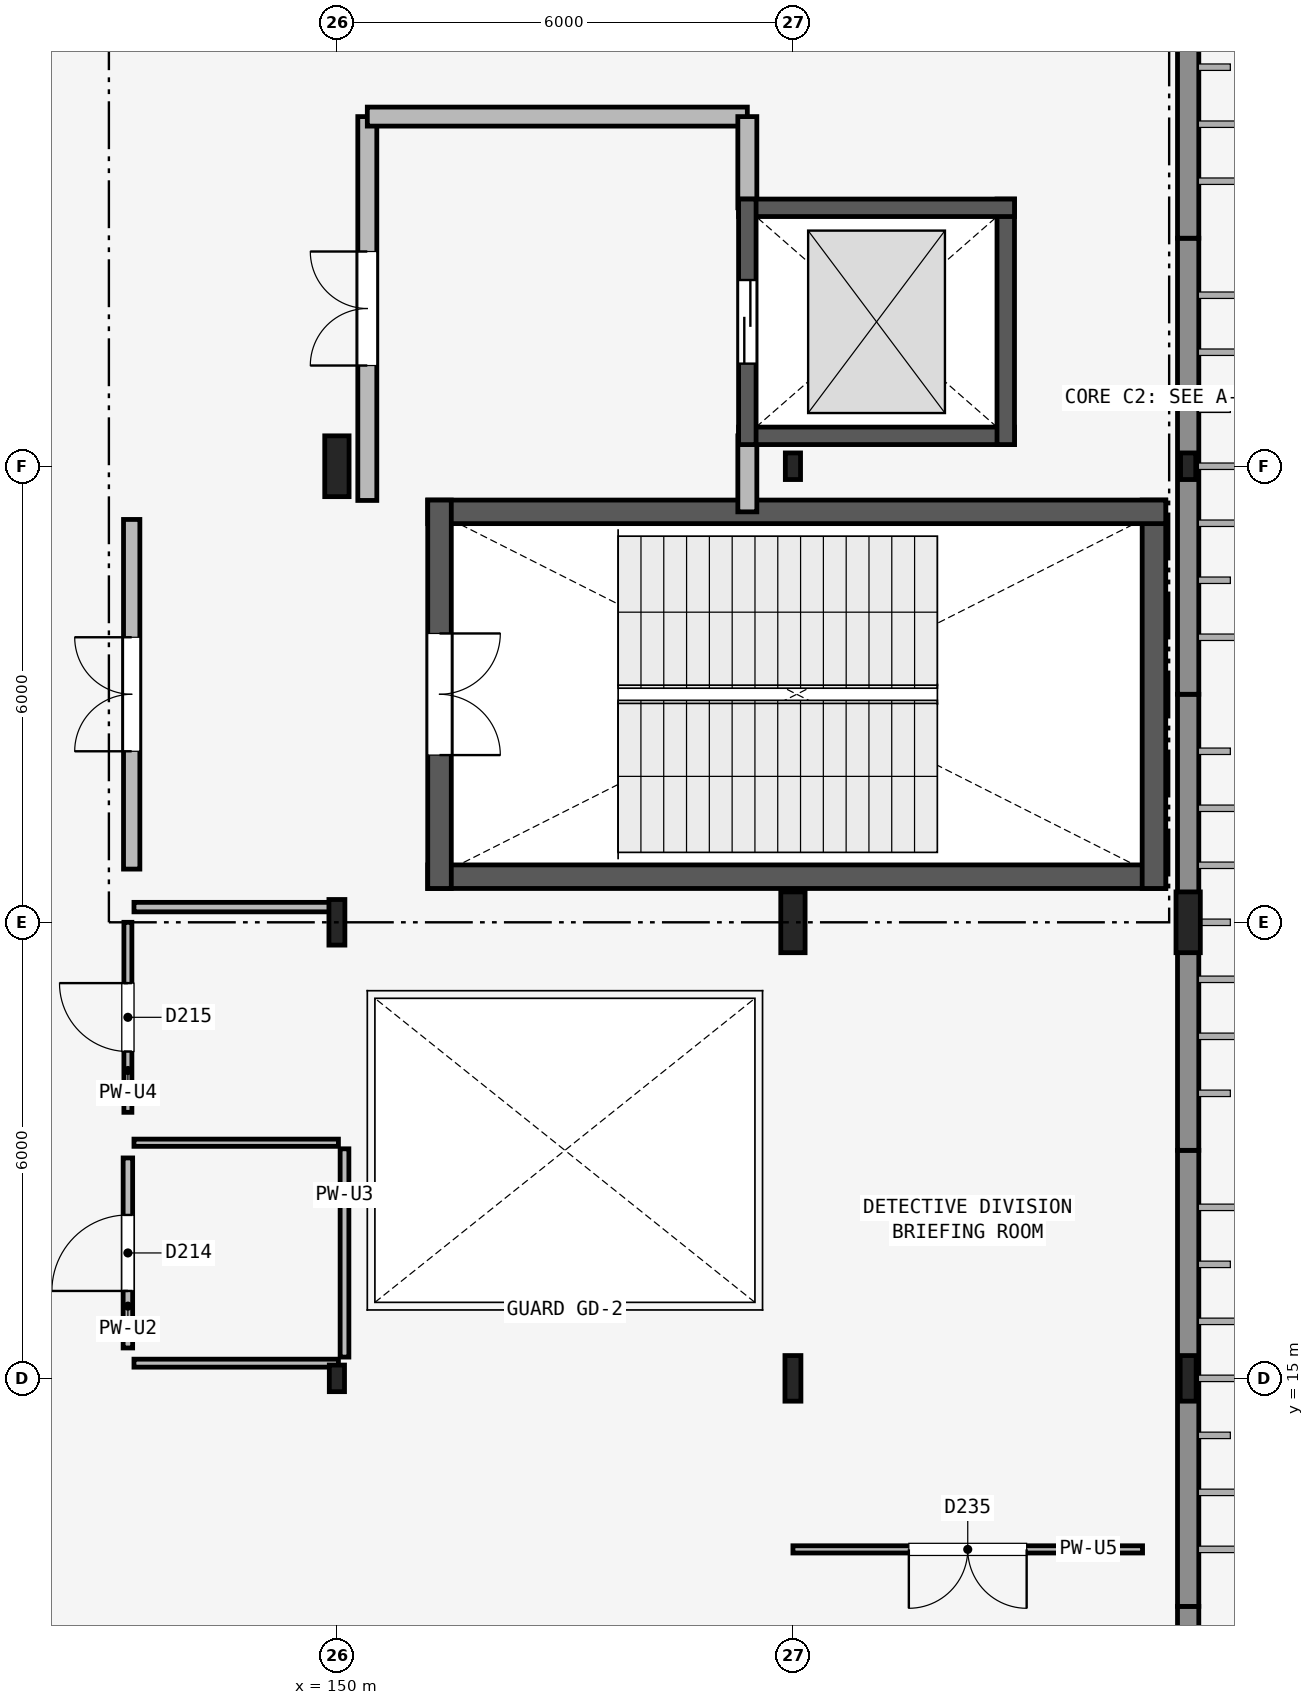
"""IFC4 building model, lengths in metres.
Left out: names, types, materials, properties, quantities, classifications, styles, units other than length and angle.
Written with IfcOpenShell. Run it as: python <this file> out.ifc"""

import sys

from ifc_helpers import new_model, si_unit, direction, frame, frame_2d, origin, origin_2d, place, context, subcontext, project, spatial, rectangle, hollow_rectangle, i_section, extrude, element, fill, save


model = new_model("IFC4")
c1 = context("Model", 3, precision=1e-05, world=origin(), true_north=direction((0.0, 1.0)))
c2 = subcontext(c1, "Body", "Model", "MODEL_VIEW")
j1 = project(units=[si_unit("LENGTHUNIT", "METRE"), si_unit("PLANEANGLEUNIT", "RADIAN")], contexts=[c1])
p1 = place(None, origin())
s1 = spatial("IfcSite", under=j1, at=p1, CompositionType="ELEMENT")
p2 = place(p1, origin())
s2 = spatial("IfcBuilding", under=s1, at=p2, CompositionType="ELEMENT")
p3 = place(p2, frame((0.0, 0.0, 9.3)))
s3 = spatial("IfcBuildingStorey", under=s2, at=p3, CompositionType="ELEMENT", Elevation=9.3)
p4 = place(p3, frame((150.0, 15.0, 0.0), z_axis=(0.0, 0.0, 1.0), x_axis=(1.0, 0.0, 0.0)))
e1 = element("IfcColumn", 1, at=p4, inside=s3, PredefinedType="COLUMN", context=c2, shape_type="SweptSolid", body=[
    extrude(hollow_rectangle(XDim=0.2, YDim=0.35, WallThickness=0.012, InnerFilletRadius=0.012, OuterFilletRadius=0.024, at=origin_2d()), origin(), (0.0, 0.0, 1.0), 4.2),
])
p5 = place(p3, frame((150.0, 21.0, 0.0), z_axis=(0.0, 0.0, 1.0), x_axis=(1.0, 0.0, 0.0)))
e2 = element("IfcColumn", 2, at=p5, inside=s3, PredefinedType="COLUMN", context=c2, shape_type="SweptSolid", body=[
    extrude(i_section(OverallWidth=0.21, OverallDepth=0.6, WebThickness=0.012, FlangeThickness=0.021, FilletRadius=0.02, at=origin_2d()), origin(), (0.0, 0.0, 1.0), 4.2),
])
p6 = place(p3, frame((150.0, 27.0, 0.0), z_axis=(0.0, 0.0, 1.0), x_axis=(1.0, 0.0, 0.0)))
e3 = element("IfcColumn", 3, at=p6, inside=s3, PredefinedType="COLUMN", context=c2, shape_type="SweptSolid", body=[
    extrude(i_section(OverallWidth=0.32, OverallDepth=0.8, WebThickness=0.016, FlangeThickness=0.028, at=origin_2d()), origin(), (0.0, 0.0, 1.0), 4.2),
])
p7 = place(p3, frame((156.0, 15.0, 0.0), z_axis=(0.0, 0.0, 1.0), x_axis=(1.0, 0.0, 0.0)))
e4 = element("IfcColumn", 4, at=p7, inside=s3, PredefinedType="COLUMN", context=c2, shape_type="SweptSolid", body=[
    extrude(i_section(OverallWidth=0.21, OverallDepth=0.6, WebThickness=0.012, FlangeThickness=0.021, FilletRadius=0.02, at=origin_2d()), origin(), (0.0, 0.0, 1.0), 4.2),
])
p8 = place(p3, frame((156.0, 21.0, 0.0), z_axis=(0.0, 0.0, 1.0), x_axis=(1.0, 0.0, 0.0)))
e5 = element("IfcColumn", 5, at=p8, inside=s3, PredefinedType="COLUMN", context=c2, shape_type="SweptSolid", body=[
    extrude(i_section(OverallWidth=0.32, OverallDepth=0.8, WebThickness=0.016, FlangeThickness=0.028, at=origin_2d()), origin(), (0.0, 0.0, 1.0), 4.2),
])
p9 = place(p3, frame((156.0, 27.0, 0.0), z_axis=(0.0, 0.0, 1.0), x_axis=(1.0, 0.0, 0.0)))
e6 = element("IfcColumn", 6, at=p9, inside=s3, PredefinedType="COLUMN", context=c2, shape_type="SweptSolid", body=[
    extrude(hollow_rectangle(XDim=0.2, YDim=0.35, WallThickness=0.012, InnerFilletRadius=0.012, OuterFilletRadius=0.024, at=origin_2d()), origin(), (0.0, 0.0, 1.0), 4.2),
])
p10 = place(p3, frame((161.2, 15.0, 0.0), z_axis=(0.0, 0.0, 1.0), x_axis=(1.0, 0.0, 0.0)))
e7 = element("IfcColumn", 7, at=p10, inside=s3, PredefinedType="COLUMN", context=c2, shape_type="SweptSolid", body=[
    extrude(i_section(OverallWidth=0.21, OverallDepth=0.6, WebThickness=0.012, FlangeThickness=0.021, FilletRadius=0.02, at=origin_2d()), origin(), (0.0, 0.0, 1.0), 4.2),
])
p11 = place(p3, frame((161.2, 21.0, 0.0), z_axis=(0.0, 0.0, 1.0), x_axis=(1.0, 0.0, 0.0)))
e8 = element("IfcColumn", 8, at=p11, inside=s3, PredefinedType="COLUMN", context=c2, shape_type="SweptSolid", body=[
    extrude(i_section(OverallWidth=0.32, OverallDepth=0.8, WebThickness=0.016, FlangeThickness=0.028, at=origin_2d()), origin(), (0.0, 0.0, 1.0), 4.2),
])
p12 = place(p3, frame((161.2, 27.0, 0.0), z_axis=(0.0, 0.0, 1.0), x_axis=(1.0, 0.0, 0.0)))
e9 = element("IfcColumn", 9, at=p12, inside=s3, PredefinedType="COLUMN", context=c2, shape_type="SweptSolid", body=[
    extrude(hollow_rectangle(XDim=0.2, YDim=0.35, WallThickness=0.012, InnerFilletRadius=0.012, OuterFilletRadius=0.024, at=origin_2d()), origin(), (0.0, 0.0, 1.0), 4.2),
])
p13 = place(p3, frame((161.2, 6.0, 0.0), z_axis=(0.0, 0.0, 1.0), x_axis=(0.0, 1.0, 0.0)))
e10 = element("IfcWall", 10, at=p13, inside=s3, PredefinedType="SOLIDWALL", context=c2, shape_type="SweptSolid", body=[
    extrude(rectangle(XDim=6.0, YDim=0.28, at=frame_2d((3.0, 0.0))), origin(), (0.0, 0.0, 1.0), 3.49),
])
for number, where, z_axis, x_axis in (
    (11, (161.2, 12.0, 0.0), (0.0, 0.0, 1.0), (0.0, 1.0, 0.0)),
    (12, (161.2, 18.0, 0.0), (0.0, 0.0, 1.0), (0.0, 1.0, 0.0)),
):
    element("IfcWall", number, at=place(p3, frame(where, z_axis=z_axis, x_axis=x_axis)), inside=s3, PredefinedType="SOLIDWALL", context=c2, shape_type="SweptSolid", body=[
        extrude(rectangle(XDim=6.0, YDim=0.28, at=frame_2d((3.0, 0.0))), origin(), (0.0, 0.0, 1.0), 3.39),
    ])
p14 = place(p3, frame((161.2, 24.0, 0.0), z_axis=(0.0, 0.0, 1.0), x_axis=(0.0, 1.0, 0.0)))
e13 = element("IfcWall", 13, at=p14, inside=s3, PredefinedType="SOLIDWALL", context=c2, shape_type="SweptSolid", body=[
    extrude(rectangle(XDim=6.0, YDim=0.28, at=frame_2d((3.0, 0.0))), origin(), (0.0, 0.0, 1.0), 3.44),
])
p15 = place(p3, frame((161.2, 30.0, 0.0), z_axis=(0.0, 0.0, 1.0), x_axis=(0.0, 1.0, 0.0)))
e14 = element("IfcWall", 14, at=p15, inside=s3, PredefinedType="SOLIDWALL", context=c2, shape_type="SweptSolid", body=[
    extrude(rectangle(XDim=6.0, YDim=0.28, at=frame_2d((3.0, 0.0))), origin(), (0.0, 0.0, 1.0), 3.484),
])
p16 = place(p3, frame((151.195, 21.6, 0.0), z_axis=(0.0, 0.0, 1.0), x_axis=(1.0, 0.0, 0.0)))
e15 = element("IfcWall", 15, at=p16, inside=s3, PredefinedType="SHEAR", context=c2, shape_type="SweptSolid", body=[
    extrude(rectangle(XDim=9.71, YDim=0.31, at=frame_2d((4.855, 0.0))), origin(), (0.0, 0.0, 1.0), 4.06),
])
p17 = place(p3, frame((160.75, 21.445, 0.0), z_axis=(0.0, 0.0, 1.0), x_axis=(0.0, 1.0, 0.0)))
e16 = element("IfcWall", 16, at=p17, inside=s3, PredefinedType="SHEAR", context=c2, shape_type="SweptSolid", body=[
    extrude(rectangle(XDim=5.11, YDim=0.31, at=frame_2d((2.555, 0.0))), origin(), (0.0, 0.0, 1.0), 4.06),
])
p18 = place(p3, frame((160.905, 26.4, 0.0), z_axis=(0.0, 0.0, 1.0), x_axis=(-1.0, 0.0, 0.0)))
e17 = element("IfcWall", 17, at=p18, inside=s3, PredefinedType="SHEAR", context=c2, shape_type="SweptSolid", body=[
    extrude(rectangle(XDim=9.71, YDim=0.31, at=frame_2d((4.855, 0.0))), origin(), (0.0, 0.0, 1.0), 4.06),
])
p19 = place(p3, frame((151.35, 26.555, 0.0), z_axis=(0.0, 0.0, 1.0), x_axis=(0.0, -1.0, 0.0)))
e18 = element("IfcWall", 18, at=p19, inside=s3, PredefinedType="SHEAR", context=c2, shape_type="SweptSolid", body=[
    extrude(rectangle(XDim=5.11, YDim=0.31, at=frame_2d((2.555, 0.0))), origin(), (0.0, 0.0, 1.0), 4.06),
])
p20 = place(p19, frame((1.755, 0.0, 0.0)))
e19 = element("IfcOpeningElement", 19, at=p20, cuts=e18, PredefinedType="OPENING", context=c2, shape_type="SweptSolid", body=[
    extrude(rectangle(XDim=1.6, YDim=2.2, at=frame_2d((0.8, 1.1))), frame((0.0, 0.165, 0.0), z_axis=(0.0, -1.0, 0.0), x_axis=(1.0, 0.0, 0.0)), (0.0, 0.0, 1.0), 0.33),
])
p21 = place(p3, frame((147.3, 21.7, 0.0), z_axis=(0.0, 0.0, 1.0), x_axis=(0.0, 1.0, 0.0)))
e20 = element("IfcWall", 20, at=p21, inside=s3, PredefinedType="PARTITIONING", context=c2, shape_type="SweptSolid", body=[
    extrude(rectangle(XDim=4.6, YDim=0.215, at=frame_2d((2.3, 0.0))), origin(), (0.0, 0.0, 1.0), 3.89),
])
p22 = place(p21, frame((1.55, 0.0, 0.0)))
e21 = element("IfcOpeningElement", 21, at=p22, cuts=e20, PredefinedType="OPENING", context=c2, shape_type="SweptSolid", body=[
    extrude(rectangle(XDim=1.5, YDim=2.15, at=frame_2d((0.75, 1.075))), frame((0.0, 0.117, 0.0), z_axis=(0.0, -1.0, 0.0), x_axis=(1.0, 0.0, 0.0)), (0.0, 0.0, 1.0), 0.235),
])
p23 = place(p3, frame((150.4, 26.55, 0.0), z_axis=(0.0, 0.0, 1.0), x_axis=(0.0, 1.0, 0.0)))
e22 = element("IfcWall", 22, at=p23, inside=s3, PredefinedType="PARTITIONING", context=c2, shape_type="SweptSolid", body=[
    extrude(rectangle(XDim=5.05, YDim=0.25, at=frame_2d((2.525, 0.0))), origin(), (0.0, 0.0, 1.0), 3.44),
])
p24 = place(p23, frame((1.775, 0.0, 0.0)))
e23 = element("IfcOpeningElement", 23, at=p24, cuts=e22, PredefinedType="OPENING", context=c2, shape_type="SweptSolid", body=[
    extrude(rectangle(XDim=1.5, YDim=2.15, at=frame_2d((0.75, 1.075))), frame((0.0, 0.135, 0.0), z_axis=(0.0, -1.0, 0.0), x_axis=(1.0, 0.0, 0.0)), (0.0, 0.0, 1.0), 0.27),
])
p25 = place(p3, frame((150.4, 31.6, 0.0), z_axis=(0.0, 0.0, 1.0), x_axis=(1.0, 0.0, 0.0)))
e24 = element("IfcWall", 24, at=p25, inside=s3, PredefinedType="PARTITIONING", context=c2, shape_type="SweptSolid", body=[
    extrude(rectangle(XDim=5.0, YDim=0.25, at=frame_2d((2.5, 0.0))), origin(), (0.0, 0.0, 1.0), 3.59),
])
p26 = place(p3, frame((155.4, 30.4, 0.0), z_axis=(0.0, 0.0, 1.0), x_axis=(0.0, 1.0, 0.0)))
e25 = element("IfcWall", 25, at=p26, inside=s3, PredefinedType="PARTITIONING", context=c2, shape_type="SweptSolid", body=[
    extrude(rectangle(XDim=1.2, YDim=0.25, at=frame_2d((0.6, 0.0))), origin(), (0.0, 0.0, 1.0), 3.89),
])
p27 = place(p3, frame((155.4, 26.4, 0.0), z_axis=(0.0, 0.0, 1.0), x_axis=(0.0, 1.0, 0.0)))
e26 = element("IfcWall", 26, at=p27, inside=s3, PredefinedType="PARTITIONING", context=c2, shape_type="SweptSolid", body=[
    extrude(rectangle(XDim=1.0, YDim=0.25, at=frame_2d((0.5, 0.0))), origin(), (0.0, 0.0, 1.0), 3.44),
])
p28 = place(p3, frame((155.285, 27.4, 0.0), z_axis=(0.0, 0.0, 1.0), x_axis=(1.0, 0.0, 0.0)))
e27 = element("IfcWall", 27, at=p28, inside=s3, PredefinedType="SHEAR", context=c2, shape_type="SweptSolid", body=[
    extrude(rectangle(XDim=3.63, YDim=0.23, at=frame_2d((1.815, 0.0))), origin(), (0.0, 0.0, 1.0), 4.2),
])
p29 = place(p3, frame((158.8, 27.285, 0.0), z_axis=(0.0, 0.0, 1.0), x_axis=(0.0, 1.0, 0.0)))
e28 = element("IfcWall", 28, at=p29, inside=s3, PredefinedType="SHEAR", context=c2, shape_type="SweptSolid", body=[
    extrude(rectangle(XDim=3.23, YDim=0.23, at=frame_2d((1.615, 0.0))), origin(), (0.0, 0.0, 1.0), 4.2),
])
p30 = place(p3, frame((158.915, 30.4, 0.0), z_axis=(0.0, 0.0, 1.0), x_axis=(-1.0, 0.0, 0.0)))
e29 = element("IfcWall", 29, at=p30, inside=s3, PredefinedType="SHEAR", context=c2, shape_type="SweptSolid", body=[
    extrude(rectangle(XDim=3.63, YDim=0.23, at=frame_2d((1.815, 0.0))), origin(), (0.0, 0.0, 1.0), 4.2),
])
p31 = place(p3, frame((155.4, 30.515, 0.0), z_axis=(0.0, 0.0, 1.0), x_axis=(0.0, -1.0, 0.0)))
e30 = element("IfcWall", 30, at=p31, inside=s3, PredefinedType="SHEAR", context=c2, shape_type="SweptSolid", body=[
    extrude(rectangle(XDim=3.23, YDim=0.23, at=frame_2d((1.615, 0.0))), origin(), (0.0, 0.0, 1.0), 4.2),
])
p32 = place(p31, frame((1.065, 0.0, 0.0)))
e31 = element("IfcOpeningElement", 31, at=p32, cuts=e30, PredefinedType="OPENING", context=c2, shape_type="SweptSolid", body=[
    extrude(rectangle(XDim=1.1, YDim=2.2, at=frame_2d((0.55, 1.1))), frame((0.0, 0.125, 0.0), z_axis=(0.0, -1.0, 0.0), x_axis=(1.0, 0.0, 0.0)), (0.0, 0.0, 1.0), 0.25),
])
p33 = place(p3, frame((147.25, 15.4, 0.0), z_axis=(0.0, 0.0, 1.0), x_axis=(0.0, 1.0, 0.0)))
e32 = element("IfcWall", 32, at=p33, inside=s3, PredefinedType="PARTITIONING", context=c2, shape_type="SweptSolid", body=[
    extrude(rectangle(XDim=2.5, YDim=0.125, at=frame_2d((1.25, 0.0))), origin(), (0.0, 0.0, 1.0), 3.89),
])
p34 = place(p33, frame((0.75, 0.0, 0.0)))
e33 = element("IfcOpeningElement", 33, at=p34, cuts=e32, PredefinedType="OPENING", context=c2, shape_type="SweptSolid", body=[
    extrude(rectangle(XDim=1.0, YDim=2.1, at=frame_2d((0.5, 1.05))), frame((0.0, 0.073, 0.0), z_axis=(0.0, -1.0, 0.0), x_axis=(1.0, 0.0, 0.0)), (0.0, 0.0, 1.0), 0.145),
])
p35 = place(p3, frame((147.25, 18.5, 0.0), z_axis=(0.0, 0.0, 1.0), x_axis=(0.0, 1.0, 0.0)))
e34 = element("IfcWall", 34, at=p35, inside=s3, PredefinedType="PARTITIONING", context=c2, shape_type="SweptSolid", body=[
    extrude(rectangle(XDim=2.5, YDim=0.105, at=frame_2d((1.25, 0.0))), origin(), (0.0, 0.0, 1.0), 3.34),
])
p36 = place(p35, frame((0.8, 0.0, 0.0)))
e35 = element("IfcOpeningElement", 35, at=p36, cuts=e34, PredefinedType="OPENING", context=c2, shape_type="SweptSolid", body=[
    extrude(rectangle(XDim=0.9, YDim=2.1, at=frame_2d((0.45, 1.05))), frame((0.0, 0.062, 0.0), z_axis=(0.0, -1.0, 0.0), x_axis=(1.0, 0.0, 0.0)), (0.0, 0.0, 1.0), 0.125),
])
p37 = place(p3, frame((160.6, 12.75, 0.0), z_axis=(0.0, 0.0, 1.0), x_axis=(-1.0, 0.0, 0.0)))
e36 = element("IfcWall", 36, at=p37, inside=s3, PredefinedType="PARTITIONING", context=c2, shape_type="SweptSolid", body=[
    extrude(rectangle(XDim=4.6, YDim=0.095, at=frame_2d((2.3, 0.0))), origin(), (0.0, 0.0, 1.0), 3.566),
])
p38 = place(p37, frame((1.525, 0.0, 0.0)))
e37 = element("IfcOpeningElement", 37, at=p38, cuts=e36, PredefinedType="OPENING", context=c2, shape_type="SweptSolid", body=[
    extrude(rectangle(XDim=1.55, YDim=2.2, at=frame_2d((0.775, 1.1))), frame((0.0, 0.057, 0.0), z_axis=(0.0, -1.0, 0.0), x_axis=(1.0, 0.0, 0.0)), (0.0, 0.0, 1.0), 0.115),
])
p39 = place(p3, frame((150.1, 18.02, 0.0), z_axis=(0.0, 0.0, 1.0), x_axis=(0.0, -1.0, 0.0)))
e38 = element("IfcWall", 38, at=p39, inside=s3, PredefinedType="PARTITIONING", context=c2, shape_type="SweptSolid", body=[
    extrude(rectangle(XDim=2.74, YDim=0.115, at=frame_2d((1.37, 0.0))), origin(), (0.0, 0.0, 1.0), 3.39),
])
p40 = place(p3, frame((150.02, 15.2, 0.0), z_axis=(0.0, 0.0, 1.0), x_axis=(-1.0, 0.0, 0.0)))
e39 = element("IfcWall", 39, at=p40, inside=s3, PredefinedType="PARTITIONING", context=c2, shape_type="SweptSolid", body=[
    extrude(rectangle(XDim=2.69, YDim=0.105, at=frame_2d((1.345, 0.0))), origin(), (0.0, 0.0, 1.0), 3.34),
])
p41 = place(p3, frame((147.33, 18.1, 0.0), z_axis=(0.0, 0.0, 1.0), x_axis=(1.0, 0.0, 0.0)))
e40 = element("IfcWall", 40, at=p41, inside=s3, PredefinedType="PARTITIONING", context=c2, shape_type="SweptSolid", body=[
    extrude(rectangle(XDim=2.69, YDim=0.095, at=frame_2d((1.345, 0.0))), origin(), (0.0, 0.0, 1.0), 3.39),
])
p42 = place(p3, frame((147.33, 21.2, 0.0), z_axis=(0.0, 0.0, 1.0), x_axis=(1.0, 0.0, 0.0)))
e41 = element("IfcWall", 41, at=p42, inside=s3, PredefinedType="PARTITIONING", context=c2, shape_type="SweptSolid", body=[
    extrude(rectangle(XDim=2.69, YDim=0.125, at=frame_2d((1.345, 0.0))), origin(), (0.0, 0.0, 1.0), 3.34),
])
p43 = place(p20, origin())
e42 = element("IfcDoor", 42, at=p43, inside=s3, OperationType="DOUBLE_DOOR_SINGLE_SWING", PredefinedType="DOOR", context=c2, shape_type="SweptSolid", body=[
    extrude(rectangle(XDim=1.6, YDim=2.2, at=frame_2d((0.8, 1.1))), frame((0.0, 0.025, 0.0), z_axis=(0.0, -1.0, 0.0), x_axis=(1.0, 0.0, 0.0)), (0.0, 0.0, 1.0), 0.05),
])
fill(e19, e42)
p44 = place(p22, origin())
e43 = element("IfcDoor", 43, at=p44, inside=s3, OperationType="DOUBLE_DOOR_SINGLE_SWING", PredefinedType="DOOR", context=c2, shape_type="SweptSolid", body=[
    extrude(rectangle(XDim=1.5, YDim=2.15, at=frame_2d((0.75, 1.075))), frame((0.0, 0.025, 0.0), z_axis=(0.0, -1.0, 0.0), x_axis=(1.0, 0.0, 0.0)), (0.0, 0.0, 1.0), 0.05),
])
fill(e21, e43)
p45 = place(p24, origin())
e44 = element("IfcDoor", 44, at=p45, inside=s3, OperationType="DOUBLE_DOOR_SINGLE_SWING", PredefinedType="DOOR", context=c2, shape_type="SweptSolid", body=[
    extrude(rectangle(XDim=1.5, YDim=2.15, at=frame_2d((0.75, 1.075))), frame((0.0, 0.025, 0.0), z_axis=(0.0, -1.0, 0.0), x_axis=(1.0, 0.0, 0.0)), (0.0, 0.0, 1.0), 0.05),
])
fill(e23, e44)
p46 = place(p32, origin())
e45 = element("IfcDoor", 45, at=p46, inside=s3, OperationType="SLIDING_TO_LEFT", PredefinedType="DOOR", context=c2, shape_type="SweptSolid", body=[
    extrude(rectangle(XDim=1.1, YDim=2.2, at=frame_2d((0.55, 1.1))), frame((0.0, 0.025, 0.0), z_axis=(0.0, -1.0, 0.0), x_axis=(1.0, 0.0, 0.0)), (0.0, 0.0, 1.0), 0.05),
])
fill(e31, e45)
p47 = place(p34, origin())
e46 = element("IfcDoor", 46, at=p47, inside=s3, OperationType="SINGLE_SWING_LEFT", PredefinedType="DOOR", context=c2, shape_type="SweptSolid", body=[
    extrude(rectangle(XDim=1.0, YDim=2.1, at=frame_2d((0.5, 1.05))), frame((0.0, 0.025, 0.0), z_axis=(0.0, -1.0, 0.0), x_axis=(1.0, 0.0, 0.0)), (0.0, 0.0, 1.0), 0.05),
])
fill(e33, e46)
p48 = place(p36, origin())
e47 = element("IfcDoor", 47, at=p48, inside=s3, OperationType="SINGLE_SWING_RIGHT", PredefinedType="DOOR", context=c2, shape_type="SweptSolid", body=[
    extrude(rectangle(XDim=0.9, YDim=2.1, at=frame_2d((0.45, 1.05))), frame((0.0, 0.025, 0.0), z_axis=(0.0, -1.0, 0.0), x_axis=(1.0, 0.0, 0.0)), (0.0, 0.0, 1.0), 0.05),
])
fill(e35, e47)
p49 = place(p38, origin())
e48 = element("IfcDoor", 48, at=p49, inside=s3, OperationType="DOUBLE_DOOR_SINGLE_SWING", PredefinedType="DOOR", context=c2, shape_type="SweptSolid", body=[
    extrude(rectangle(XDim=1.55, YDim=2.2, at=frame_2d((0.775, 1.1))), frame((0.0, 0.025, 0.0), z_axis=(0.0, -1.0, 0.0), x_axis=(1.0, 0.0, 0.0)), (0.0, 0.0, 1.0), 0.05),
])
fill(e37, e48)
save(model, sys.argv[1])
